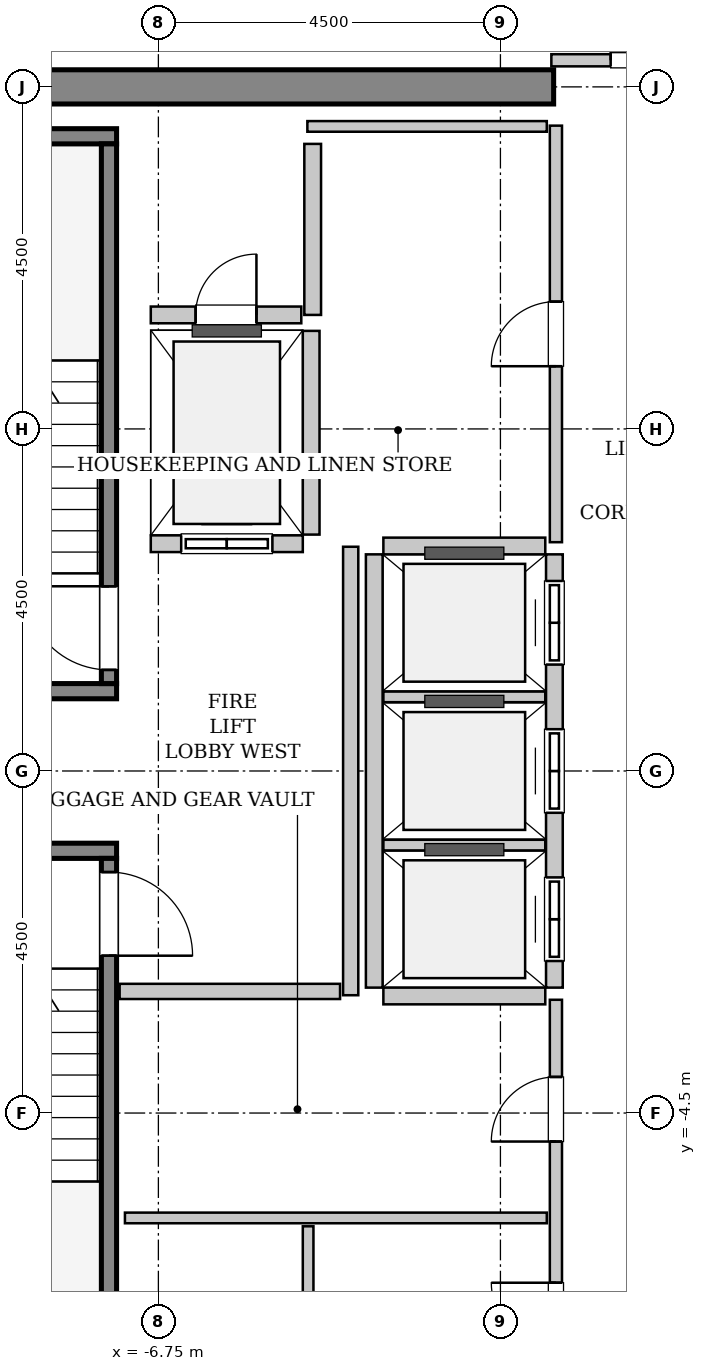
"""IFC4 building model, lengths in metres.
Left out: names, types, materials, properties, quantities, classifications, styles, units other than length and angle.
Written with IfcOpenShell. Run it as: python <this file> out.ifc"""

import sys

from ifc_helpers import new_model, si_unit, direction, frame, frame_2d, origin, place, context, subcontext, project, spatial, rectangle, extrude, source, transform, mapped, element, fill, save


model = new_model("IFC4")
c1 = context("Model", 3, precision=1e-05, world=origin(), true_north=direction((0.0, 1.0)))
c2 = subcontext(c1, "Body", "Model", "MODEL_VIEW")
j1 = project(units=[si_unit("LENGTHUNIT", "METRE"), si_unit("PLANEANGLEUNIT", "RADIAN")], contexts=[c1])
p1 = place(None, origin())
s1 = spatial("IfcSite", under=j1, at=p1, CompositionType="ELEMENT")
p2 = place(p1, origin())
s2 = spatial("IfcBuilding", under=s1, at=p2, CompositionType="ELEMENT")
p3 = place(p2, frame((0.0, 0.0, 272.2)))
s3 = spatial("IfcBuildingStorey", under=s2, at=p3, CompositionType="ELEMENT", Elevation=272.2)
m1 = source(origin(), c2, "Body", "SweptSolid", [
    extrude(rectangle(XDim=9.925, YDim=0.45, at=frame_2d((4.962, 0.0))), origin(), (0.0, 0.0, 1.0), 3.8),
])
p4 = place(p3, frame((-11.475, 9.0, 0.0), z_axis=(0.0, 0.0, 1.0), x_axis=(1.0, 0.0, 0.0)))
e1 = element("IfcWall", 1, at=p4, inside=s3, PredefinedType="SHEAR", context=c2, shape_type="MappedRepresentation", body=[
    mapped(m1, transform((0.0, 0.0, 0.0), x_axis=(1.0, 0.0, 0.0), y_axis=(0.0, 1.0, 0.0), z_axis=(0.0, 0.0, 1.0), scale=1.0)),
])
m2 = source(origin(), c2, "Body", "SweptSolid", [
    extrude(rectangle(XDim=3.4, YDim=0.2, at=frame_2d((1.7, 0.0))), origin(), (0.0, 0.0, 1.0), 3.8),
])
p5 = place(p3, frame((-7.3, 1.05, 0.0), z_axis=(0.0, 0.0, 1.0), x_axis=(-1.0, 0.0, 0.0)))
e2 = element("IfcWall", 2, at=p5, inside=s3, PredefinedType="SOLIDWALL", context=c2, shape_type="MappedRepresentation", body=[
    mapped(m2, transform((0.0, 0.0, 0.0), x_axis=(1.0, 0.0, 0.0), y_axis=(0.0, 1.0, 0.0), z_axis=(0.0, 0.0, 1.0), scale=1.0)),
])
m3 = source(origin(), c2, "Body", "SweptSolid", [
    extrude(rectangle(XDim=3.73, YDim=0.2, at=frame_2d((1.865, 0.0))), origin(), (0.0, 0.0, 1.0), 3.8),
])
p6 = place(p3, frame((-7.3, 8.35, 0.0), z_axis=(0.0, 0.0, 1.0), x_axis=(-1.0, 0.0, 0.0)))
e3 = element("IfcWall", 3, at=p6, inside=s3, PredefinedType="SOLIDWALL", context=c2, shape_type="MappedRepresentation", body=[
    mapped(m3, transform((0.0, 0.0, 0.0), x_axis=(1.0, 0.0, 0.0), y_axis=(0.0, 1.0, 0.0), z_axis=(0.0, 0.0, 1.0), scale=1.0)),
])
m4 = source(origin(), c2, "Body", "SweptSolid", [
    extrude(rectangle(XDim=7.1, YDim=0.2, at=frame_2d((3.55, 0.0))), origin(), (0.0, 0.0, 1.0), 3.8),
])
p7 = place(p3, frame((-7.4, 1.15, 0.0), z_axis=(0.0, 0.0, 1.0), x_axis=(0.0, 1.0, 0.0)))
e4 = element("IfcWall", 4, at=p7, inside=s3, PredefinedType="SOLIDWALL", context=c2, shape_type="MappedRepresentation", body=[
    mapped(m4, transform((0.0, 0.0, 0.0), x_axis=(1.0, 0.0, 0.0), y_axis=(0.0, 1.0, 0.0), z_axis=(0.0, 0.0, 1.0), scale=1.0)),
])
p8 = place(p7, frame((0.18, 0.0, 0.0)))
e5 = element("IfcOpeningElement", 5, at=p8, cuts=e4, PredefinedType="OPENING", context=c2, shape_type="SweptSolid", body=[
    extrude(rectangle(XDim=1.1, YDim=2.15, at=frame_2d((0.55, 1.075))), frame((0.0, 0.11, 0.0), z_axis=(0.0, -1.0, 0.0), x_axis=(1.0, 0.0, 0.0)), (0.0, 0.0, 1.0), 0.22),
])
p9 = place(p3, frame((-10.7, -1.05, 0.0), z_axis=(0.0, 0.0, 1.0), x_axis=(1.0, 0.0, 0.0)))
e6 = element("IfcWall", 6, at=p9, inside=s3, PredefinedType="SOLIDWALL", context=c2, shape_type="MappedRepresentation", body=[
    mapped(m2, transform((0.0, 0.0, 0.0), x_axis=(1.0, 0.0, 0.0), y_axis=(0.0, 1.0, 0.0), z_axis=(0.0, 0.0, 1.0), scale=1.0)),
])
p10 = place(p3, frame((-7.4, -1.15, 0.0), z_axis=(0.0, 0.0, 1.0), x_axis=(0.0, -1.0, 0.0)))
e7 = element("IfcWall", 7, at=p10, inside=s3, PredefinedType="SOLIDWALL", context=c2, shape_type="MappedRepresentation", body=[
    mapped(m4, transform((0.0, 0.0, 0.0), x_axis=(1.0, 0.0, 0.0), y_axis=(0.0, 1.0, 0.0), z_axis=(0.0, 0.0, 1.0), scale=1.0)),
])
p11 = place(p10, frame((0.18, 0.0, 0.0)))
e8 = element("IfcOpeningElement", 8, at=p11, cuts=e7, PredefinedType="OPENING", context=c2, shape_type="SweptSolid", body=[
    extrude(rectangle(XDim=1.1, YDim=2.15, at=frame_2d((0.55, 1.075))), frame((0.0, 0.11, 0.0), z_axis=(0.0, -1.0, 0.0), x_axis=(1.0, 0.0, 0.0)), (0.0, 0.0, 1.0), 0.22),
])
m5 = source(origin(), c2, "Body", "SweptSolid", [
    extrude(rectangle(XDim=2.0, YDim=0.22, at=frame_2d((1.0, 0.0))), origin(), (0.0, 0.0, 1.0), 3.535),
])
p12 = place(p3, frame((-6.85, 2.99, 0.0), z_axis=(0.0, 0.0, 1.0), x_axis=(1.0, 0.0, 0.0)))
e9 = element("IfcWall", 9, at=p12, inside=s3, PredefinedType="SOLIDWALL", context=c2, shape_type="MappedRepresentation", body=[
    mapped(m5, transform((0.0, 0.0, 0.0), x_axis=(1.0, 0.0, 0.0), y_axis=(0.0, 1.0, 0.0), z_axis=(0.0, 0.0, 1.0), scale=1.0)),
])
p13 = place(p12, frame((0.4, 0.0, 0.0)))
e10 = element("IfcOpeningElement", 10, at=p13, cuts=e9, PredefinedType="OPENING", context=c2, shape_type="SweptSolid", body=[
    extrude(rectangle(XDim=1.2, YDim=2.2, at=frame_2d((0.6, 1.1))), frame((0.0, 0.12, 0.0), z_axis=(0.0, -1.0, 0.0), x_axis=(1.0, 0.0, 0.0)), (0.0, 0.0, 1.0), 0.24),
])
m6 = source(origin(), c2, "Body", "SweptSolid", [
    extrude(rectangle(XDim=2.68, YDim=0.22, at=frame_2d((1.34, 0.0))), origin(), (0.0, 0.0, 1.0), 3.535),
])
p14 = place(p3, frame((-4.74, 3.11, 0.0), z_axis=(0.0, 0.0, 1.0), x_axis=(0.0, 1.0, 0.0)))
e11 = element("IfcWall", 11, at=p14, inside=s3, PredefinedType="SOLIDWALL", context=c2, shape_type="MappedRepresentation", body=[
    mapped(m6, transform((0.0, 0.0, 0.0), x_axis=(1.0, 0.0, 0.0), y_axis=(0.0, 1.0, 0.0), z_axis=(0.0, 0.0, 1.0), scale=1.0)),
])
m7 = source(origin(), c2, "Body", "SweptSolid", [
    extrude(rectangle(XDim=5.7, YDim=0.22, at=frame_2d((2.85, 0.0))), origin(), (0.0, 0.0, 1.0), 3.535),
])
p15 = place(p3, frame((-1.54, -2.85, 0.0), z_axis=(0.0, 0.0, 1.0), x_axis=(0.0, 1.0, 0.0)))
e12 = element("IfcWall", 12, at=p15, inside=s3, PredefinedType="SOLIDWALL", context=c2, shape_type="MappedRepresentation", body=[
    mapped(m7, transform((0.0, 0.0, 0.0), x_axis=(1.0, 0.0, 0.0), y_axis=(0.0, 1.0, 0.0), z_axis=(0.0, 0.0, 1.0), scale=1.0)),
])
p16 = place(p15, frame((0.35, 0.0, 0.0)))
e13 = element("IfcOpeningElement", 13, at=p16, cuts=e12, PredefinedType="OPENING", context=c2, shape_type="SweptSolid", body=[
    extrude(rectangle(XDim=1.1, YDim=2.2, at=frame_2d((0.55, 1.1))), frame((0.0, 0.12, 0.0), z_axis=(0.0, -1.0, 0.0), x_axis=(1.0, 0.0, 0.0)), (0.0, 0.0, 1.0), 0.24),
])
p17 = place(p15, frame((2.3, 0.0, 0.0)))
e14 = element("IfcOpeningElement", 14, at=p17, cuts=e12, PredefinedType="OPENING", context=c2, shape_type="SweptSolid", body=[
    extrude(rectangle(XDim=1.1, YDim=2.2, at=frame_2d((0.55, 1.1))), frame((0.0, 0.12, 0.0), z_axis=(0.0, -1.0, 0.0), x_axis=(1.0, 0.0, 0.0)), (0.0, 0.0, 1.0), 0.24),
])
p18 = place(p15, frame((4.25, 0.0, 0.0)))
e15 = element("IfcOpeningElement", 15, at=p18, cuts=e12, PredefinedType="OPENING", context=c2, shape_type="SweptSolid", body=[
    extrude(rectangle(XDim=1.1, YDim=2.2, at=frame_2d((0.55, 1.1))), frame((0.0, 0.12, 0.0), z_axis=(0.0, -1.0, 0.0), x_axis=(1.0, 0.0, 0.0)), (0.0, 0.0, 1.0), 0.24),
])
p19 = place(p3, frame((-3.91, 2.85, 0.0), z_axis=(0.0, 0.0, 1.0), x_axis=(0.0, -1.0, 0.0)))
e16 = element("IfcWall", 16, at=p19, inside=s3, PredefinedType="SOLIDWALL", context=c2, shape_type="MappedRepresentation", body=[
    mapped(m7, transform((0.0, 0.0, 0.0), x_axis=(1.0, 0.0, 0.0), y_axis=(0.0, 1.0, 0.0), z_axis=(0.0, 0.0, 1.0), scale=1.0)),
])
m8 = source(origin(), c2, "Body", "SweptSolid", [
    extrude(rectangle(XDim=2.13, YDim=0.22, at=frame_2d((1.065, 0.0))), origin(), (0.0, 0.0, 1.0), 3.535),
])
p20 = place(p3, frame((-3.79, -2.96, 0.0), z_axis=(0.0, 0.0, 1.0), x_axis=(1.0, 0.0, 0.0)))
e17 = element("IfcWall", 17, at=p20, inside=s3, PredefinedType="SOLIDWALL", context=c2, shape_type="MappedRepresentation", body=[
    mapped(m8, transform((0.0, 0.0, 0.0), x_axis=(1.0, 0.0, 0.0), y_axis=(0.0, 1.0, 0.0), z_axis=(0.0, 0.0, 1.0), scale=1.0)),
])
m9 = source(origin(), c2, "Body", "SweptSolid", [
    extrude(rectangle(XDim=2.13, YDim=0.14, at=frame_2d((1.065, 0.0))), origin(), (0.0, 0.0, 1.0), 3.535),
])
for number, where, z_axis, x_axis in (
    (18, (-3.79, -0.975, 0.0), (0.0, 0.0, 1.0), (1.0, 0.0, 0.0)),
    (19, (-3.79, 0.975, 0.0), (0.0, 0.0, 1.0), (1.0, 0.0, 0.0)),
):
    element("IfcWall", number, at=place(p3, frame(where, z_axis=z_axis, x_axis=x_axis)), inside=s3, PredefinedType="PARTITIONING", context=c2, shape_type="MappedRepresentation", body=[
        mapped(m9, transform((0.0, 0.0, 0.0), x_axis=(1.0, 0.0, 0.0), y_axis=(0.0, 1.0, 0.0), z_axis=(0.0, 0.0, 1.0), scale=1.0)),
    ])
p21 = place(p3, frame((-1.66, 2.96, 0.0), z_axis=(0.0, 0.0, 1.0), x_axis=(-1.0, 0.0, 0.0)))
e20 = element("IfcWall", 20, at=p21, inside=s3, PredefinedType="SOLIDWALL", context=c2, shape_type="MappedRepresentation", body=[
    mapped(m8, transform((0.0, 0.0, 0.0), x_axis=(1.0, 0.0, 0.0), y_axis=(0.0, 1.0, 0.0), z_axis=(0.0, 0.0, 1.0), scale=1.0)),
])
m10 = source(origin(), c2, "Body", "SweptSolid", [
    extrude(rectangle(XDim=2.25, YDim=0.22, at=frame_2d((1.125, 0.0))), origin(), (0.0, 0.0, 1.0), 3.535),
])
p22 = place(p3, frame((-4.72, 6.0, 0.0), z_axis=(0.0, 0.0, 1.0), x_axis=(0.0, 1.0, 0.0)))
e21 = element("IfcWall", 21, at=p22, inside=s3, PredefinedType="SOLIDWALL", context=c2, shape_type="MappedRepresentation", body=[
    mapped(m10, transform((0.0, 0.0, 0.0), x_axis=(1.0, 0.0, 0.0), y_axis=(0.0, 1.0, 0.0), z_axis=(0.0, 0.0, 1.0), scale=1.0)),
])
m11 = source(origin(), c2, "Body", "SweptSolid", [
    extrude(rectangle(XDim=1.98, YDim=0.22, at=frame_2d((0.99, 0.0))), origin(), (0.0, 0.0, 1.0), 3.535),
])
p23 = place(p3, frame((-6.85, 6.0, 0.0), z_axis=(0.0, 0.0, 1.0), x_axis=(1.0, 0.0, 0.0)))
e22 = element("IfcWall", 22, at=p23, inside=s3, PredefinedType="SOLIDWALL", context=c2, shape_type="MappedRepresentation", body=[
    mapped(m11, transform((0.0, 0.0, 0.0), x_axis=(1.0, 0.0, 0.0), y_axis=(0.0, 1.0, 0.0), z_axis=(0.0, 0.0, 1.0), scale=1.0)),
])
p24 = place(p23, frame((0.59, 0.0, 0.0)))
e23 = element("IfcOpeningElement", 23, at=p24, cuts=e22, PredefinedType="OPENING", context=c2, shape_type="SweptSolid", body=[
    extrude(rectangle(XDim=0.8, YDim=2.0, at=frame_2d((0.4, 1.0))), frame((0.0, 0.12, 0.0), z_axis=(0.0, -1.0, 0.0), x_axis=(1.0, 0.0, 0.0)), (0.0, 0.0, 1.0), 0.24),
])
m12 = source(origin(), c2, "Body", "SweptSolid", [
    extrude(rectangle(XDim=5.9, YDim=0.2, at=frame_2d((2.95, 0.0))), origin(), (0.0, 0.0, 1.0), 3.535),
])
p25 = place(p3, frame((-4.22, -2.95, 0.0), z_axis=(0.0, 0.0, 1.0), x_axis=(0.0, 1.0, 0.0)))
e24 = element("IfcWall", 24, at=p25, inside=s3, PredefinedType="PARTITIONING", context=c2, shape_type="MappedRepresentation", body=[
    mapped(m12, transform((0.0, 0.0, 0.0), x_axis=(1.0, 0.0, 0.0), y_axis=(0.0, 1.0, 0.0), z_axis=(0.0, 0.0, 1.0), scale=1.0)),
])
m13 = source(origin(), c2, "Body", "SweptSolid", [
    extrude(rectangle(XDim=2.9, YDim=0.2, at=frame_2d((1.45, 0.0))), origin(), (0.0, 0.0, 1.0), 3.535),
])
p26 = place(p3, frame((-7.26, -2.9, 0.0), z_axis=(0.0, 0.0, 1.0), x_axis=(1.0, 0.0, 0.0)))
e25 = element("IfcWall", 25, at=p26, inside=s3, PredefinedType="PARTITIONING", context=c2, shape_type="MappedRepresentation", body=[
    mapped(m13, transform((0.0, 0.0, 0.0), x_axis=(1.0, 0.0, 0.0), y_axis=(0.0, 1.0, 0.0), z_axis=(0.0, 0.0, 1.0), scale=1.0)),
])
m14 = source(origin(), c2, "Body", "SweptSolid", [
    extrude(rectangle(XDim=3.16, YDim=0.16, at=frame_2d((1.58, 0.0))), origin(), (0.0, 0.0, 1.0), 2.625),
])
p27 = place(p3, frame((-1.58, 9.35, 0.0), z_axis=(0.0, 0.0, 1.0), x_axis=(1.0, 0.0, 0.0)))
e26 = element("IfcWall", 26, at=p27, inside=s3, PredefinedType="PARTITIONING", context=c2, shape_type="MappedRepresentation", body=[
    mapped(m14, transform((0.0, 0.0, 0.0), x_axis=(1.0, 0.0, 0.0), y_axis=(0.0, 1.0, 0.0), z_axis=(0.0, 0.0, 1.0), scale=1.0)),
])
p28 = place(p27, frame((0.78, 0.0, 0.0)))
e27 = element("IfcOpeningElement", 27, at=p28, cuts=e26, PredefinedType="OPENING", context=c2, shape_type="SweptSolid", body=[
    extrude(rectangle(XDim=1.6, YDim=2.3, at=frame_2d((0.8, 1.15))), frame((0.0, 0.09, 0.0), z_axis=(0.0, -1.0, 0.0), x_axis=(1.0, 0.0, 0.0)), (0.0, 0.0, 1.0), 0.18),
])
m15 = source(origin(), c2, "Body", "SweptSolid", [
    extrude(rectangle(XDim=5.48, YDim=0.16, at=frame_2d((2.74, 0.0))), origin(), (0.0, 0.0, 1.0), 3.535),
])
p29 = place(p3, frame((-1.52, 3.01, 0.0), z_axis=(0.0, 0.0, 1.0), x_axis=(0.0, 1.0, 0.0)))
e28 = element("IfcWall", 28, at=p29, inside=s3, PredefinedType="PARTITIONING", context=c2, shape_type="MappedRepresentation", body=[
    mapped(m15, transform((0.0, 0.0, 0.0), x_axis=(1.0, 0.0, 0.0), y_axis=(0.0, 1.0, 0.0), z_axis=(0.0, 0.0, 1.0), scale=1.0)),
])
p30 = place(p29, frame((2.315, 0.0, 0.0)))
e29 = element("IfcOpeningElement", 29, at=p30, cuts=e28, PredefinedType="OPENING", context=c2, shape_type="SweptSolid", body=[
    extrude(rectangle(XDim=0.85, YDim=2.1, at=frame_2d((0.425, 1.05))), frame((0.0, 0.09, 0.0), z_axis=(0.0, -1.0, 0.0), x_axis=(1.0, 0.0, 0.0)), (0.0, 0.0, 1.0), 0.18),
])
m16 = source(origin(), c2, "Body", "SweptSolid", [
    extrude(rectangle(XDim=3.15, YDim=0.14, at=frame_2d((1.575, 0.0))), origin(), (0.0, 0.0, 1.0), 3.535),
])
p31 = place(p3, frame((-4.79, 8.48, 0.0), z_axis=(0.0, 0.0, 1.0), x_axis=(1.0, 0.0, 0.0)))
e30 = element("IfcWall", 30, at=p31, inside=s3, PredefinedType="PARTITIONING", context=c2, shape_type="MappedRepresentation", body=[
    mapped(m16, transform((0.0, 0.0, 0.0), x_axis=(1.0, 0.0, 0.0), y_axis=(0.0, 1.0, 0.0), z_axis=(0.0, 0.0, 1.0), scale=1.0)),
])
p32 = place(p3, frame((-1.52, -8.49, 0.0), z_axis=(0.0, 0.0, 1.0), x_axis=(0.0, 1.0, 0.0)))
e31 = element("IfcWall", 31, at=p32, inside=s3, PredefinedType="PARTITIONING", context=c2, shape_type="MappedRepresentation", body=[
    mapped(m15, transform((0.0, 0.0, 0.0), x_axis=(1.0, 0.0, 0.0), y_axis=(0.0, 1.0, 0.0), z_axis=(0.0, 0.0, 1.0), scale=1.0)),
])
p33 = place(p32, frame((0.907, 0.0, 0.0)))
e32 = element("IfcOpeningElement", 32, at=p33, cuts=e31, PredefinedType="OPENING", context=c2, shape_type="SweptSolid", body=[
    extrude(rectangle(XDim=0.85, YDim=2.1, at=frame_2d((0.425, 1.05))), frame((0.0, 0.09, 0.0), z_axis=(0.0, -1.0, 0.0), x_axis=(1.0, 0.0, 0.0)), (0.0, 0.0, 1.0), 0.18),
])
p34 = place(p32, frame((3.615, 0.0, 0.0)))
e33 = element("IfcOpeningElement", 33, at=p34, cuts=e31, PredefinedType="OPENING", context=c2, shape_type="SweptSolid", body=[
    extrude(rectangle(XDim=0.85, YDim=2.1, at=frame_2d((0.425, 1.05))), frame((0.0, 0.09, 0.0), z_axis=(0.0, -1.0, 0.0), x_axis=(1.0, 0.0, 0.0)), (0.0, 0.0, 1.0), 0.18),
])
m17 = source(origin(), c2, "Body", "SweptSolid", [
    extrude(rectangle(XDim=5.55, YDim=0.14, at=frame_2d((2.775, 0.0))), origin(), (0.0, 0.0, 1.0), 3.535),
])
p35 = place(p3, frame((-7.19, -5.88, 0.0), z_axis=(0.0, 0.0, 1.0), x_axis=(1.0, 0.0, 0.0)))
e34 = element("IfcWall", 34, at=p35, inside=s3, PredefinedType="PARTITIONING", context=c2, shape_type="MappedRepresentation", body=[
    mapped(m17, transform((0.0, 0.0, 0.0), x_axis=(1.0, 0.0, 0.0), y_axis=(0.0, 1.0, 0.0), z_axis=(0.0, 0.0, 1.0), scale=1.0)),
])
m18 = source(origin(), c2, "Body", "SweptSolid", [
    extrude(rectangle(XDim=2.38, YDim=0.14, at=frame_2d((1.19, 0.0))), origin(), (0.0, 0.0, 1.0), 3.535),
])
p36 = place(p3, frame((-4.78, -8.37, 0.0), z_axis=(0.0, 0.0, 1.0), x_axis=(0.0, 1.0, 0.0)))
e35 = element("IfcWall", 35, at=p36, inside=s3, PredefinedType="PARTITIONING", context=c2, shape_type="MappedRepresentation", body=[
    mapped(m18, transform((0.0, 0.0, 0.0), x_axis=(1.0, 0.0, 0.0), y_axis=(0.0, 1.0, 0.0), z_axis=(0.0, 0.0, 1.0), scale=1.0)),
])
m19 = source(origin(), c2, "Body", "SweptSolid", [
    extrude(rectangle(XDim=1.1, YDim=2.15, at=frame_2d((0.55, 1.075))), frame((0.0, 0.025, 0.0), z_axis=(0.0, -1.0, 0.0), x_axis=(1.0, 0.0, 0.0)), (0.0, 0.0, 1.0), 0.05),
])
p37 = place(p8, origin())
e36 = element("IfcDoor", 36, at=p37, inside=s3, OperationType="SINGLE_SWING_RIGHT", PredefinedType="DOOR", context=c2, shape_type="MappedRepresentation", body=[
    mapped(m19, transform((0.0, 0.0, 0.0), x_axis=(1.0, 0.0, 0.0), y_axis=(0.0, 1.0, 0.0), z_axis=(0.0, 0.0, 1.0), scale=1.0)),
])
fill(e5, e36)
p38 = place(p11, origin())
e37 = element("IfcDoor", 37, at=p38, inside=s3, OperationType="SINGLE_SWING_RIGHT", PredefinedType="DOOR", context=c2, shape_type="MappedRepresentation", body=[
    mapped(m19, transform((0.0, 0.0, 0.0), x_axis=(1.0, 0.0, 0.0), y_axis=(0.0, 1.0, 0.0), z_axis=(0.0, 0.0, 1.0), scale=1.0)),
])
fill(e8, e37)
m20 = source(origin(), c2, "Body", "SweptSolid", [
    extrude(rectangle(XDim=1.2, YDim=2.2, at=frame_2d((0.6, 1.1))), frame((0.0, 0.025, 0.0), z_axis=(0.0, -1.0, 0.0), x_axis=(1.0, 0.0, 0.0)), (0.0, 0.0, 1.0), 0.05),
])
p39 = place(p13, origin())
e38 = element("IfcDoor", 38, at=p39, inside=s3, OperationType="SLIDING_TO_LEFT", PredefinedType="DOOR", context=c2, shape_type="MappedRepresentation", body=[
    mapped(m20, transform((0.0, 0.0, 0.0), x_axis=(1.0, 0.0, 0.0), y_axis=(0.0, 1.0, 0.0), z_axis=(0.0, 0.0, 1.0), scale=1.0)),
])
fill(e10, e38)
m21 = source(origin(), c2, "Body", "SweptSolid", [
    extrude(rectangle(XDim=1.1, YDim=2.2, at=frame_2d((0.55, 1.1))), frame((0.0, 0.025, 0.0), z_axis=(0.0, -1.0, 0.0), x_axis=(1.0, 0.0, 0.0)), (0.0, 0.0, 1.0), 0.05),
])
p40 = place(p16, origin())
e39 = element("IfcDoor", 39, at=p40, inside=s3, OperationType="DOUBLE_DOOR_SLIDING", PredefinedType="DOOR", context=c2, shape_type="MappedRepresentation", body=[
    mapped(m21, transform((0.0, 0.0, 0.0), x_axis=(1.0, 0.0, 0.0), y_axis=(0.0, 1.0, 0.0), z_axis=(0.0, 0.0, 1.0), scale=1.0)),
])
fill(e13, e39)
p41 = place(p17, origin())
e40 = element("IfcDoor", 40, at=p41, inside=s3, OperationType="DOUBLE_DOOR_SLIDING", PredefinedType="DOOR", context=c2, shape_type="MappedRepresentation", body=[
    mapped(m21, transform((0.0, 0.0, 0.0), x_axis=(1.0, 0.0, 0.0), y_axis=(0.0, 1.0, 0.0), z_axis=(0.0, 0.0, 1.0), scale=1.0)),
])
fill(e14, e40)
p42 = place(p18, origin())
e41 = element("IfcDoor", 41, at=p42, inside=s3, OperationType="DOUBLE_DOOR_SLIDING", PredefinedType="DOOR", context=c2, shape_type="MappedRepresentation", body=[
    mapped(m21, transform((0.0, 0.0, 0.0), x_axis=(1.0, 0.0, 0.0), y_axis=(0.0, 1.0, 0.0), z_axis=(0.0, 0.0, 1.0), scale=1.0)),
])
fill(e15, e41)
m22 = source(origin(), c2, "Body", "SweptSolid", [
    extrude(rectangle(XDim=0.8, YDim=2.0, at=frame_2d((0.4, 1.0))), frame((0.0, 0.025, 0.0), z_axis=(0.0, -1.0, 0.0), x_axis=(1.0, 0.0, 0.0)), (0.0, 0.0, 1.0), 0.05),
])
p43 = place(p24, origin())
e42 = element("IfcDoor", 42, at=p43, inside=s3, OperationType="SINGLE_SWING_RIGHT", PredefinedType="TRAPDOOR", context=c2, shape_type="MappedRepresentation", body=[
    mapped(m22, transform((0.0, 0.0, 0.0), x_axis=(1.0, 0.0, 0.0), y_axis=(0.0, 1.0, 0.0), z_axis=(0.0, 0.0, 1.0), scale=1.0)),
])
fill(e23, e42)
m23 = source(origin(), c2, "Body", "SweptSolid", [
    extrude(rectangle(XDim=1.6, YDim=2.3, at=frame_2d((0.8, 1.15))), frame((0.0, 0.025, 0.0), z_axis=(0.0, -1.0, 0.0), x_axis=(1.0, 0.0, 0.0)), (0.0, 0.0, 1.0), 0.05),
])
p44 = place(p28, origin())
e43 = element("IfcDoor", 43, at=p44, inside=s3, OperationType="DOUBLE_DOOR_SINGLE_SWING", PredefinedType="DOOR", context=c2, shape_type="MappedRepresentation", body=[
    mapped(m23, transform((0.0, 0.0, 0.0), x_axis=(1.0, 0.0, 0.0), y_axis=(0.0, 1.0, 0.0), z_axis=(0.0, 0.0, 1.0), scale=1.0)),
])
fill(e27, e43)
m24 = source(origin(), c2, "Body", "SweptSolid", [
    extrude(rectangle(XDim=0.85, YDim=2.1, at=frame_2d((0.425, 1.05))), frame((0.0, 0.025, 0.0), z_axis=(0.0, -1.0, 0.0), x_axis=(1.0, 0.0, 0.0)), (0.0, 0.0, 1.0), 0.05),
])
p45 = place(p30, origin())
e44 = element("IfcDoor", 44, at=p45, inside=s3, OperationType="SINGLE_SWING_LEFT", PredefinedType="DOOR", context=c2, shape_type="MappedRepresentation", body=[
    mapped(m24, transform((0.0, 0.0, 0.0), x_axis=(1.0, 0.0, 0.0), y_axis=(0.0, 1.0, 0.0), z_axis=(0.0, 0.0, 1.0), scale=1.0)),
])
fill(e29, e44)
p46 = place(p33, origin())
e45 = element("IfcDoor", 45, at=p46, inside=s3, OperationType="SINGLE_SWING_RIGHT", PredefinedType="DOOR", context=c2, shape_type="MappedRepresentation", body=[
    mapped(m24, transform((0.0, 0.0, 0.0), x_axis=(1.0, 0.0, 0.0), y_axis=(0.0, 1.0, 0.0), z_axis=(0.0, 0.0, 1.0), scale=1.0)),
])
fill(e32, e45)
p47 = place(p34, origin())
e46 = element("IfcDoor", 46, at=p47, inside=s3, OperationType="SINGLE_SWING_LEFT", PredefinedType="DOOR", context=c2, shape_type="MappedRepresentation", body=[
    mapped(m24, transform((0.0, 0.0, 0.0), x_axis=(1.0, 0.0, 0.0), y_axis=(0.0, 1.0, 0.0), z_axis=(0.0, 0.0, 1.0), scale=1.0)),
])
fill(e33, e46)
save(model, sys.argv[1])
